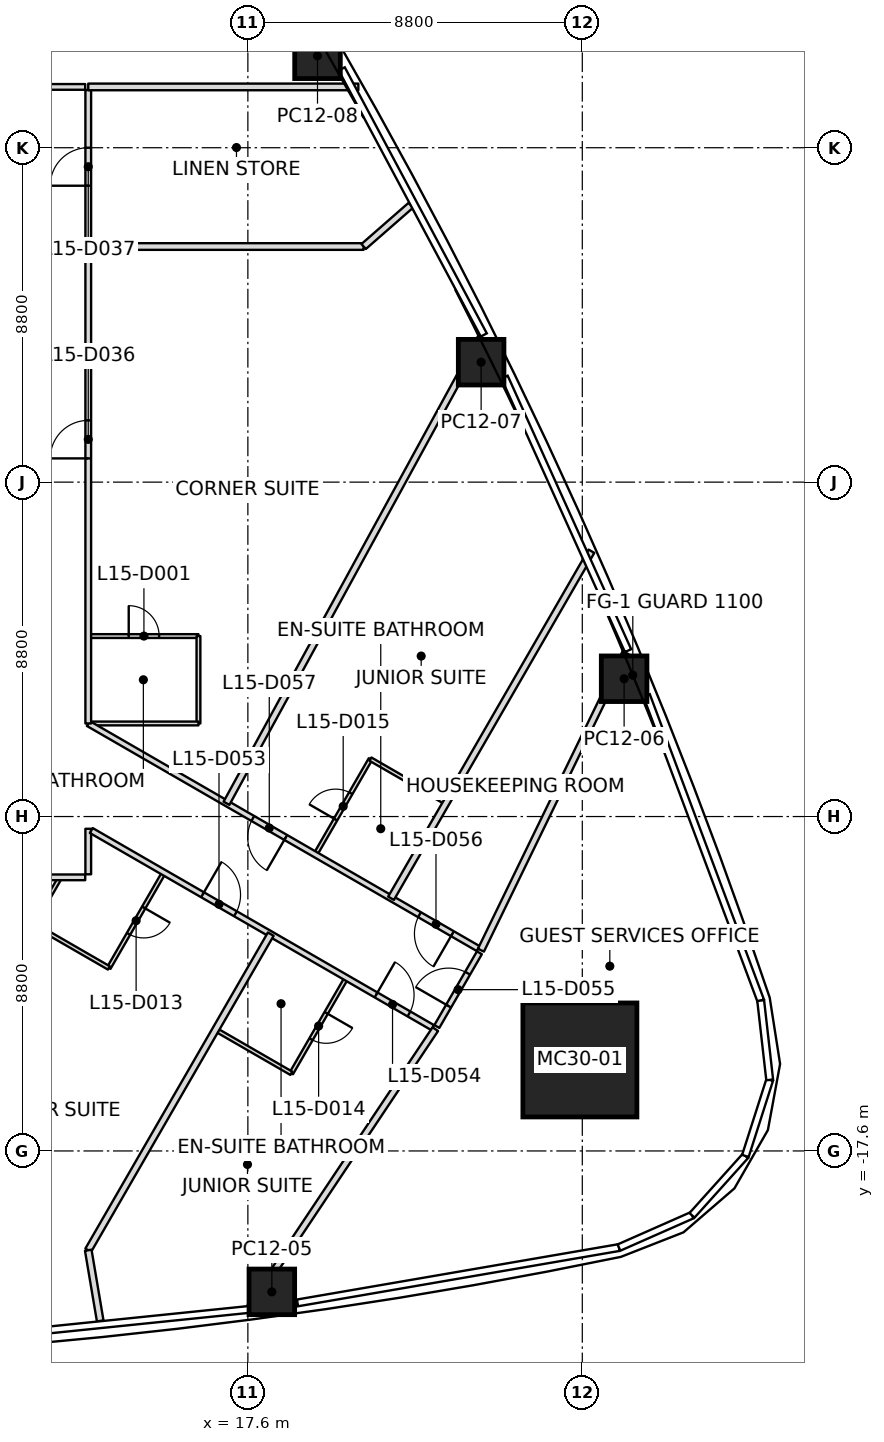
"""IFC4 building model, lengths in metres.
Left out: names, types, materials, properties, quantities, classifications, styles, units other than length and angle.
Written with IfcOpenShell. Run it as: python <this file> out.ifc"""

import sys

from ifc_helpers import new_model, si_unit, direction, frame, frame_2d, origin, origin_2d, place, context, subcontext, project, spatial, rectangle, extrude, clip, halfspace, element, fill, save


model = new_model("IFC4")
c1 = context("Model", 3, precision=1e-05, world=origin(), true_north=direction((0.0, 1.0)))
c2 = subcontext(c1, "Body", "Model", "MODEL_VIEW")
j1 = project(units=[si_unit("LENGTHUNIT", "METRE"), si_unit("PLANEANGLEUNIT", "RADIAN")], contexts=[c1])
p1 = place(None, origin())
s1 = spatial("IfcSite", under=j1, at=p1, CompositionType="ELEMENT")
p2 = place(p1, origin())
s2 = spatial("IfcBuilding", under=s1, at=p2, CompositionType="ELEMENT")
p3 = place(p2, frame((0.0, 0.0, 77.6)))
s3 = spatial("IfcBuildingStorey", under=s2, at=p3, CompositionType="ELEMENT", Elevation=77.6)
p4 = place(p3, frame((26.337, -15.206, 0.0), z_axis=(-0.030531956516, 0.017672925154, 0.999377539946), x_axis=(0.99953379114, 0.000539840661, 0.030527183636)))
e1 = element("IfcColumn", 1, at=p4, inside=s3, PredefinedType="COLUMN", context=c2, shape_type="SweptSolid", body=[
    extrude(rectangle(XDim=3.0, YDim=3.0, at=origin_2d()), origin(), (0.0, 0.0, 1.0), 3.702),
])
p5 = place(p3, frame((18.231, -21.308, 0.0), z_axis=(-0.019253687779, 0.03270489431, 0.999279583197), x_axis=(0.990559922783, 0.136298030063, 0.014624854803)))
e2 = element("IfcColumn", 2, at=p5, inside=s3, PredefinedType="COLUMN", context=c2, shape_type="SweptSolid", body=[
    clip(clip(extrude(rectangle(XDim=1.2, YDim=1.2, at=origin_2d()), origin(), (0.0, 0.0, 1.0), 3.703), halfspace(frame((0.0, 0.0, 0.015)), True)), halfspace(frame((0.0, 0.0, 3.695)), False)),
])
p6 = place(p3, frame((27.5, -5.174, 0.0), z_axis=(-0.019460655113, 0.011016709844, 0.999749926235), x_axis=(-0.381127273401, 0.924354950562, -0.017604739188)))
e3 = element("IfcColumn", 3, at=p6, inside=s3, PredefinedType="COLUMN", context=c2, shape_type="SweptSolid", body=[
    extrude(rectangle(XDim=1.2, YDim=1.2, at=origin_2d()), origin(), (0.0, 0.0, 1.0), 3.701),
])
p7 = place(p3, frame((23.738, 3.156, 0.0), z_axis=(-0.015240683228, 0.002309194428, 0.99988118754), x_axis=(-0.441517205772, 0.897209609592, -0.00880190108)))
e4 = element("IfcColumn", 4, at=p7, inside=s3, PredefinedType="COLUMN", context=c2, shape_type="SweptSolid", body=[
    extrude(rectangle(XDim=1.2, YDim=1.2, at=origin_2d()), origin(), (0.0, 0.0, 1.0), 3.7),
])
p8 = place(p3, frame((19.432, 11.219, 0.0), z_axis=(-0.010688725148, -0.006202099777, 0.999923639641), x_axis=(-0.499971436973, 0.8660418936, 2.7223042e-05)))
e5 = element("IfcColumn", 5, at=p8, inside=s3, PredefinedType="COLUMN", context=c2, shape_type="SweptSolid", body=[
    extrude(rectangle(XDim=1.2, YDim=1.2, at=origin_2d()), origin(), (0.0, 0.0, 1.0), 3.7),
])
p9 = place(p3, frame((18.202, -11.895, 0.0), z_axis=(0.0, 0.0, 1.0), x_axis=(-0.500004836318, -0.866022611517, 0.0)))
e6 = element("IfcWall", 6, at=p9, inside=s3, PredefinedType="PARTITIONING", context=c2, shape_type="SweptSolid", body=[
    extrude(rectangle(XDim=9.604, YDim=0.175, at=frame_2d((4.802, 0.0))), origin(), (0.0, 0.0, 1.0), 3.093),
])
p10 = place(p3, frame((13.4, -20.212, 0.0), z_axis=(0.0, 0.0, 1.0), x_axis=(0.166811851032, -0.985988745552, 0.0)))
e7 = element("IfcWall", 7, at=p10, inside=s3, PredefinedType="PARTITIONING", context=c2, shape_type="SweptSolid", body=[
    extrude(rectangle(XDim=1.886, YDim=0.175, at=frame_2d((0.943, 0.0))), origin(), (0.0, 0.0, 1.0), 2.934),
])
p11 = place(p3, frame((13.4, 6.2, 0.0), z_axis=(0.0, 0.0, 1.0), x_axis=(1.0, 0.0, 0.0)))
e8 = element("IfcWall", 8, at=p11, inside=s3, PredefinedType="PARTITIONING", context=c2, shape_type="SweptSolid", body=[
    extrude(rectangle(XDim=7.246, YDim=0.175, at=frame_2d((3.623, 0.0))), origin(), (0.0, 0.0, 1.0), 3.017),
])
p12 = place(p3, frame((20.646, 6.2, 0.0), z_axis=(0.0, 0.0, 1.0), x_axis=(0.752769014964, 0.658284748501, 0.0)))
e9 = element("IfcWall", 9, at=p12, inside=s3, PredefinedType="PARTITIONING", context=c2, shape_type="SweptSolid", body=[
    extrude(rectangle(XDim=1.651, YDim=0.175, at=frame_2d((0.826, 0.0))), origin(), (0.0, 0.0, 1.0), 2.934),
])
p13 = place(p3, frame((13.4, 10.4, 0.0), z_axis=(0.0, 0.0, 1.0), x_axis=(1.0, 0.0, 0.0)))
e10 = element("IfcWall", 10, at=p13, inside=s3, PredefinedType="PARTITIONING", context=c2, shape_type="SweptSolid", body=[
    extrude(rectangle(XDim=7.107, YDim=0.175, at=frame_2d((3.554, 0.0))), origin(), (0.0, 0.0, 1.0), 2.934),
])
p14 = place(p3, frame((23.741, 3.817, 0.0), z_axis=(0.0, 0.0, 1.0), x_axis=(-0.479523714328, -0.877528921117, 0.0)))
e11 = element("IfcWall", 11, at=p14, inside=s3, PredefinedType="PARTITIONING", context=c2, shape_type="SweptSolid", body=[
    extrude(rectangle(XDim=13.98, YDim=0.175, at=frame_2d((6.99, 0.0))), origin(), (0.0, 0.0, 1.0), 2.947),
])
p15 = place(p3, frame((22.532, -14.395, 0.0), z_axis=(0.0, 0.0, 1.0), x_axis=(-0.554931610564, -0.83189597162, 0.0)))
e12 = element("IfcWall", 12, at=p15, inside=s3, PredefinedType="PARTITIONING", context=c2, shape_type="SweptSolid", body=[
    extrude(rectangle(XDim=8.764, YDim=0.175, at=frame_2d((4.382, 0.0))), origin(), (0.0, 0.0, 1.0), 3.15),
])
p16 = place(p3, frame((26.64, -1.818, 0.0), z_axis=(0.0, 0.0, 1.0), x_axis=(-0.499990990727, -0.866030605228, 0.0)))
e13 = element("IfcWall", 13, at=p16, inside=s3, PredefinedType="PARTITIONING", context=c2, shape_type="SweptSolid", body=[
    extrude(rectangle(XDim=10.546, YDim=0.175, at=frame_2d((5.273, 0.0))), origin(), (0.0, 0.0, 1.0), 2.934),
])
p17 = place(p3, frame((23.732, -12.316, 0.0), z_axis=(0.0, 0.0, 1.0), x_axis=(0.437369474661, 0.899281903874, 0.0)))
e14 = element("IfcWall", 14, at=p17, inside=s3, PredefinedType="PARTITIONING", context=c2, shape_type="SweptSolid", body=[
    extrude(rectangle(XDim=8.704, YDim=0.175, at=frame_2d((4.352, 0.0))), origin(), (0.0, 0.0, 1.0), 3.15),
])
p18 = place(p3, frame((-13.32, -10.4, 0.0), z_axis=(0.0, 0.0, 1.0), x_axis=(1.0, 0.0, 0.0)))
e15 = element("IfcWall", 15, at=p18, inside=s3, PredefinedType="PARTITIONING", context=c2, shape_type="SweptSolid", body=[
    extrude(rectangle(XDim=26.64, YDim=0.15, at=frame_2d((13.32, 0.0))), origin(), (0.0, 0.0, 1.0), 2.947),
])
p19 = place(p18, frame((7.72, 0.0, 0.0)))
e16 = element("IfcOpeningElement", 16, at=p19, cuts=e15, PredefinedType="OPENING", context=c2, shape_type="SweptSolid", body=[
    extrude(rectangle(XDim=1.0, YDim=2.1, at=frame_2d((0.5, 1.05))), frame((0.0, 0.075, 0.0), z_axis=(0.0, -1.0, 0.0), x_axis=(1.0, 0.0, 0.0)), (0.0, 0.0, 1.0), 0.15),
])
p20 = place(p18, frame((11.92, 0.0, 0.0)))
e17 = element("IfcOpeningElement", 17, at=p20, cuts=e15, PredefinedType="OPENING", context=c2, shape_type="SweptSolid", body=[
    extrude(rectangle(XDim=1.0, YDim=2.1, at=frame_2d((0.5, 1.05))), frame((0.0, 0.075, 0.0), z_axis=(0.0, -1.0, 0.0), x_axis=(1.0, 0.0, 0.0)), (0.0, 0.0, 1.0), 0.15),
])
p21 = place(p18, frame((16.52, 0.0, 0.0)))
e18 = element("IfcOpeningElement", 18, at=p21, cuts=e15, PredefinedType="OPENING", context=c2, shape_type="SweptSolid", body=[
    extrude(rectangle(XDim=1.0, YDim=2.1, at=frame_2d((0.5, 1.05))), frame((0.0, 0.075, 0.0), z_axis=(0.0, -1.0, 0.0), x_axis=(1.0, 0.0, 0.0)), (0.0, 0.0, 1.0), 0.15),
])
p22 = place(p18, frame((21.12, 0.0, 0.0)))
e19 = element("IfcOpeningElement", 19, at=p22, cuts=e15, PredefinedType="OPENING", context=c2, shape_type="SweptSolid", body=[
    extrude(rectangle(XDim=1.0, YDim=2.1, at=frame_2d((0.5, 1.05))), frame((0.0, 0.075, 0.0), z_axis=(0.0, -1.0, 0.0), x_axis=(1.0, 0.0, 0.0)), (0.0, 0.0, 1.0), 0.15),
])
p23 = place(p3, frame((13.32, 10.4, 0.0), z_axis=(0.0, 0.0, 1.0), x_axis=(-1.0, 0.0, 0.0)))
e20 = element("IfcWall", 20, at=p23, inside=s3, PredefinedType="PARTITIONING", context=c2, shape_type="SweptSolid", body=[
    extrude(rectangle(XDim=7.04, YDim=0.15, at=frame_2d((3.52, 0.0))), origin(), (0.0, 0.0, 1.0), 2.947),
])
p24 = place(p23, frame((0.91, 0.0, 0.0)))
e21 = element("IfcOpeningElement", 21, at=p24, cuts=e20, PredefinedType="OPENING", context=c2, shape_type="SweptSolid", body=[
    extrude(rectangle(XDim=1.0, YDim=2.1, at=frame_2d((0.5, 1.05))), frame((0.0, 0.075, 0.0), z_axis=(0.0, -1.0, 0.0), x_axis=(1.0, 0.0, 0.0)), (0.0, 0.0, 1.0), 0.15),
])
p25 = place(p3, frame((13.4, -10.32, 0.0), z_axis=(0.0, 0.0, 1.0), x_axis=(0.0, 1.0, 0.0)))
e22 = element("IfcWall", 22, at=p25, inside=s3, PredefinedType="PARTITIONING", context=c2, shape_type="SweptSolid", body=[
    extrude(rectangle(XDim=1.198, YDim=0.15, at=frame_2d((0.599, 0.0))), origin(), (0.0, 0.0, 1.0), 2.797),
])
p26 = place(p3, frame((13.479, -9.168, 0.0), z_axis=(0.0, 0.0, 1.0), x_axis=(0.866028819782, -0.499994083273, 0.0)))
e23 = element("IfcWall", 23, at=p26, inside=s3, PredefinedType="PARTITIONING", context=c2, shape_type="SweptSolid", body=[
    extrude(rectangle(XDim=10.374, YDim=0.15, at=frame_2d((5.187, 0.0))), origin(), (0.0, 0.0, 1.0), 2.797),
])
p27 = place(p26, frame((3.381, 0.0, 0.0)))
e24 = element("IfcOpeningElement", 24, at=p27, cuts=e23, PredefinedType="OPENING", context=c2, shape_type="SweptSolid", body=[
    extrude(rectangle(XDim=1.0, YDim=2.1, at=frame_2d((0.5, 1.05))), frame((0.0, 0.075, 0.0), z_axis=(0.0, -1.0, 0.0), x_axis=(1.0, 0.0, 0.0)), (0.0, 0.0, 1.0), 0.15),
])
p28 = place(p26, frame((8.654, 0.0, 0.0)))
e25 = element("IfcOpeningElement", 25, at=p28, cuts=e23, PredefinedType="OPENING", context=c2, shape_type="SweptSolid", body=[
    extrude(rectangle(XDim=1.0, YDim=2.1, at=frame_2d((0.5, 1.05))), frame((0.0, 0.075, 0.0), z_axis=(0.0, -1.0, 0.0), x_axis=(1.0, 0.0, 0.0)), (0.0, 0.0, 1.0), 0.15),
])
p29 = place(p3, frame((23.663, -12.276, 0.0), z_axis=(0.0, 0.0, 1.0), x_axis=(-0.866031207587, 0.499989947384, 0.0)))
e26 = element("IfcWall", 26, at=p29, inside=s3, PredefinedType="PARTITIONING", context=c2, shape_type="SweptSolid", body=[
    extrude(rectangle(XDim=11.851, YDim=0.15, at=frame_2d((5.925, 0.0))), origin(), (0.0, 0.0, 1.0), 2.947),
])
p30 = place(p29, frame((0.785, 0.0, 0.0)))
e27 = element("IfcOpeningElement", 27, at=p30, cuts=e26, PredefinedType="OPENING", context=c2, shape_type="SweptSolid", body=[
    extrude(rectangle(XDim=1.0, YDim=2.1, at=frame_2d((0.5, 1.05))), frame((0.0, 0.075, 0.0), z_axis=(0.0, -1.0, 0.0), x_axis=(1.0, 0.0, 0.0)), (0.0, 0.0, 1.0), 0.15),
])
p31 = place(p29, frame((5.851, 0.0, 0.0)))
e28 = element("IfcOpeningElement", 28, at=p31, cuts=e26, PredefinedType="OPENING", context=c2, shape_type="SweptSolid", body=[
    extrude(rectangle(XDim=1.0, YDim=2.1, at=frame_2d((0.5, 1.05))), frame((0.0, 0.075, 0.0), z_axis=(0.0, -1.0, 0.0), x_axis=(1.0, 0.0, 0.0)), (0.0, 0.0, 1.0), 0.15),
])
p32 = place(p3, frame((13.4, -6.351, 0.0), z_axis=(0.0, 0.0, 1.0), x_axis=(0.0, 1.0, 0.0)))
e29 = element("IfcWall", 29, at=p32, inside=s3, PredefinedType="PARTITIONING", context=c2, shape_type="SweptSolid", body=[
    extrude(rectangle(XDim=16.671, YDim=0.15, at=frame_2d((8.335, 0.0))), origin(), (0.0, 0.0, 1.0), 2.947),
])
p33 = place(p32, frame((6.976, 0.0, 0.0)))
e30 = element("IfcOpeningElement", 30, at=p33, cuts=e29, PredefinedType="OPENING", context=c2, shape_type="SweptSolid", body=[
    extrude(rectangle(XDim=1.0, YDim=2.1, at=frame_2d((0.5, 1.05))), frame((0.0, 0.075, 0.0), z_axis=(0.0, -1.0, 0.0), x_axis=(1.0, 0.0, 0.0)), (0.0, 0.0, 1.0), 0.15),
])
p34 = place(p32, frame((14.151, 0.0, 0.0)))
e31 = element("IfcOpeningElement", 31, at=p34, cuts=e29, PredefinedType="OPENING", context=c2, shape_type="SweptSolid", body=[
    extrude(rectangle(XDim=1.0, YDim=2.1, at=frame_2d((0.5, 1.05))), frame((0.0, 0.075, 0.0), z_axis=(0.0, -1.0, 0.0), x_axis=(1.0, 0.0, 0.0)), (0.0, 0.0, 1.0), 0.15),
])
p35 = place(p3, frame((22.573, -14.325, 0.0), z_axis=(0.0, 0.0, 1.0), x_axis=(0.49994888933, 0.866054910533, 0.0)))
e32 = element("IfcWall", 32, at=p35, inside=s3, PredefinedType="PARTITIONING", context=c2, shape_type="SweptSolid", body=[
    extrude(rectangle(XDim=2.24, YDim=0.15, at=frame_2d((1.12, 0.0))), origin(), (0.0, 0.0, 1.0), 2.797),
])
p36 = place(p35, frame((0.62, 0.0, 0.0)))
e33 = element("IfcOpeningElement", 33, at=p36, cuts=e32, PredefinedType="OPENING", context=c2, shape_type="SweptSolid", body=[
    extrude(rectangle(XDim=1.0, YDim=2.1, at=frame_2d((0.5, 1.05))), frame((0.0, 0.075, 0.0), z_axis=(0.0, -1.0, 0.0), x_axis=(1.0, 0.0, 0.0)), (0.0, 0.0, 1.0), 0.15),
])
p37 = place(p3, frame((15.377, -10.298, 0.0), z_axis=(0.0, 0.0, 1.0), x_axis=(-0.499999802827, -0.866025517622, 0.0)))
e34 = element("IfcWall", 34, at=p37, inside=s3, PredefinedType="PARTITIONING", context=c2, shape_type="SweptSolid", body=[
    extrude(rectangle(XDim=2.87, YDim=0.1, at=frame_2d((1.435, 0.0))), origin(), (0.0, 0.0, 1.0), 2.797),
])
p38 = place(p37, frame((1.035, 0.0, 0.0)))
e35 = element("IfcOpeningElement", 35, at=p38, cuts=e34, PredefinedType="OPENING", context=c2, shape_type="SweptSolid", body=[
    extrude(rectangle(XDim=0.8, YDim=2.1, at=frame_2d((0.4, 1.05))), frame((0.0, 0.05, 0.0), z_axis=(0.0, -1.0, 0.0), x_axis=(1.0, 0.0, 0.0)), (0.0, 0.0, 1.0), 0.1),
])
p39 = place(p3, frame((13.942, -12.784, 0.0), z_axis=(0.0, 0.0, 1.0), x_axis=(-0.866007057882, 0.500031774688, 0.0)))
e36 = element("IfcWall", 36, at=p39, inside=s3, PredefinedType="PARTITIONING", context=c2, shape_type="SweptSolid", body=[
    extrude(rectangle(XDim=2.3, YDim=0.1, at=frame_2d((1.15, 0.0))), origin(), (0.0, 0.0, 1.0), 3.15),
])
p40 = place(p3, frame((11.95, -11.634, 0.0), z_axis=(0.0, 0.0, 1.0), x_axis=(0.500087364259, 0.86597495813, 0.0)))
e37 = element("IfcWall", 37, at=p40, inside=s3, PredefinedType="PARTITIONING", context=c2, shape_type="SweptSolid", body=[
    extrude(rectangle(XDim=1.39, YDim=0.1, at=frame_2d((0.695, 0.0))), origin(), (0.0, 0.0, 1.0), 3.15),
])
p41 = place(p3, frame((13.43, -4.051, 0.0), z_axis=(0.0, 0.0, 1.0), x_axis=(1.0, 0.0, 0.0)))
e38 = element("IfcWall", 38, at=p41, inside=s3, PredefinedType="PARTITIONING", context=c2, shape_type="SweptSolid", body=[
    extrude(rectangle(XDim=2.87, YDim=0.1, at=frame_2d((1.435, 0.0))), origin(), (0.0, 0.0, 1.0), 2.947),
])
p42 = place(p41, frame((1.035, 0.0, 0.0)))
e39 = element("IfcOpeningElement", 39, at=p42, cuts=e38, PredefinedType="OPENING", context=c2, shape_type="SweptSolid", body=[
    extrude(rectangle(XDim=0.8, YDim=2.1, at=frame_2d((0.4, 1.05))), frame((0.0, 0.05, 0.0), z_axis=(0.0, -1.0, 0.0), x_axis=(1.0, 0.0, 0.0)), (0.0, 0.0, 1.0), 0.1),
])
p43 = place(p3, frame((16.3, -4.051, 0.0), z_axis=(0.0, 0.0, 1.0), x_axis=(0.0, -1.0, 0.0)))
e40 = element("IfcWall", 40, at=p43, inside=s3, PredefinedType="PARTITIONING", context=c2, shape_type="SweptSolid", body=[
    extrude(rectangle(XDim=2.3, YDim=0.1, at=frame_2d((1.15, 0.0))), origin(), (0.0, 0.0, 1.0), 3.15),
])
p44 = place(p3, frame((16.3, -6.351, 0.0), z_axis=(0.0, 0.0, 1.0), x_axis=(-1.0, 0.0, 0.0)))
e41 = element("IfcWall", 41, at=p44, inside=s3, PredefinedType="PARTITIONING", context=c2, shape_type="SweptSolid", body=[
    extrude(rectangle(XDim=2.84, YDim=0.1, at=frame_2d((1.42, 0.0))), origin(), (0.0, 0.0, 1.0), 3.15),
])
p45 = place(p3, frame((20.179, -13.071, 0.0), z_axis=(0.0, 0.0, 1.0), x_axis=(-0.500036638401, -0.866004249561, 0.0)))
e42 = element("IfcWall", 42, at=p45, inside=s3, PredefinedType="PARTITIONING", context=c2, shape_type="SweptSolid", body=[
    extrude(rectangle(XDim=2.87, YDim=0.1, at=frame_2d((1.435, 0.0))), origin(), (0.0, 0.0, 1.0), 3.15),
])
p46 = place(p45, frame((1.035, 0.0, 0.0)))
e43 = element("IfcOpeningElement", 43, at=p46, cuts=e42, PredefinedType="OPENING", context=c2, shape_type="SweptSolid", body=[
    extrude(rectangle(XDim=0.8, YDim=2.1, at=frame_2d((0.4, 1.05))), frame((0.0, 0.05, 0.0), z_axis=(0.0, -1.0, 0.0), x_axis=(1.0, 0.0, 0.0)), (0.0, 0.0, 1.0), 0.1),
])
p47 = place(p3, frame((18.744, -15.556, 0.0), z_axis=(0.0, 0.0, 1.0), x_axis=(-0.866017224141, 0.500014167291, 0.0)))
e44 = element("IfcWall", 44, at=p47, inside=s3, PredefinedType="PARTITIONING", context=c2, shape_type="SweptSolid", body=[
    extrude(rectangle(XDim=2.27, YDim=0.1, at=frame_2d((1.135, 0.0))), origin(), (0.0, 0.0, 1.0), 3.15),
])
p48 = place(p3, frame((19.391, -9.775, 0.0), z_axis=(0.0, 0.0, 1.0), x_axis=(0.499999802827, 0.866025517622, 0.0)))
e45 = element("IfcWall", 45, at=p48, inside=s3, PredefinedType="PARTITIONING", context=c2, shape_type="SweptSolid", body=[
    extrude(rectangle(XDim=2.87, YDim=0.1, at=frame_2d((1.435, 0.0))), origin(), (0.0, 0.0, 1.0), 3.15),
])
p49 = place(p48, frame((1.035, 0.0, 0.0)))
e46 = element("IfcOpeningElement", 46, at=p49, cuts=e45, PredefinedType="OPENING", context=c2, shape_type="SweptSolid", body=[
    extrude(rectangle(XDim=0.8, YDim=2.1, at=frame_2d((0.4, 1.05))), frame((0.0, 0.05, 0.0), z_axis=(0.0, -1.0, 0.0), x_axis=(1.0, 0.0, 0.0)), (0.0, 0.0, 1.0), 0.1),
])
p50 = place(p3, frame((20.826, -7.289, 0.0), z_axis=(0.0, 0.0, 1.0), x_axis=(0.866017224141, -0.500014167291, 0.0)))
e47 = element("IfcWall", 47, at=p50, inside=s3, PredefinedType="PARTITIONING", context=c2, shape_type="SweptSolid", body=[
    extrude(rectangle(XDim=2.27, YDim=0.1, at=frame_2d((1.135, 0.0))), origin(), (0.0, 0.0, 1.0), 3.15),
])
p51 = place(p33, origin())
e48 = element("IfcDoor", 48, at=p51, inside=s3, OperationType="SINGLE_SWING_LEFT", PredefinedType="DOOR", context=c2, shape_type="SweptSolid", body=[
    extrude(rectangle(XDim=1.0, YDim=2.1, at=frame_2d((0.5, 1.05))), frame((0.0, 0.025, 0.0), z_axis=(0.0, -1.0, 0.0), x_axis=(1.0, 0.0, 0.0)), (0.0, 0.0, 1.0), 0.05),
])
fill(e30, e48)
p52 = place(p42, origin())
e49 = element("IfcDoor", 49, at=p52, inside=s3, OperationType="SINGLE_SWING_LEFT", PredefinedType="DOOR", context=c2, shape_type="SweptSolid", body=[
    extrude(rectangle(XDim=0.8, YDim=2.1, at=frame_2d((0.4, 1.05))), frame((0.0, 0.025, 0.0), z_axis=(0.0, -1.0, 0.0), x_axis=(1.0, 0.0, 0.0)), (0.0, 0.0, 1.0), 0.05),
])
fill(e39, e49)
p53 = place(p34, origin())
e50 = element("IfcDoor", 50, at=p53, inside=s3, OperationType="SINGLE_SWING_RIGHT", PredefinedType="DOOR", context=c2, shape_type="SweptSolid", body=[
    extrude(rectangle(XDim=1.0, YDim=2.1, at=frame_2d((0.5, 1.05))), frame((0.0, 0.025, 0.0), z_axis=(0.0, -1.0, 0.0), x_axis=(1.0, 0.0, 0.0)), (0.0, 0.0, 1.0), 0.05),
])
fill(e31, e50)
p54 = place(p27, origin())
e51 = element("IfcDoor", 51, at=p54, inside=s3, OperationType="SINGLE_SWING_LEFT", PredefinedType="DOOR", context=c2, shape_type="SweptSolid", body=[
    extrude(rectangle(XDim=1.0, YDim=2.1, at=frame_2d((0.5, 1.05))), frame((0.0, 0.025, 0.0), z_axis=(0.0, -1.0, 0.0), x_axis=(1.0, 0.0, 0.0)), (0.0, 0.0, 1.0), 0.05),
])
fill(e24, e51)
p55 = place(p38, origin())
e52 = element("IfcDoor", 52, at=p55, inside=s3, OperationType="SINGLE_SWING_RIGHT", PredefinedType="DOOR", context=c2, shape_type="SweptSolid", body=[
    extrude(rectangle(XDim=0.8, YDim=2.1, at=frame_2d((0.4, 1.05))), frame((0.0, 0.025, 0.0), z_axis=(0.0, -1.0, 0.0), x_axis=(1.0, 0.0, 0.0)), (0.0, 0.0, 1.0), 0.05),
])
fill(e35, e52)
p56 = place(p28, origin())
e53 = element("IfcDoor", 53, at=p56, inside=s3, OperationType="SINGLE_SWING_LEFT", PredefinedType="DOOR", context=c2, shape_type="SweptSolid", body=[
    extrude(rectangle(XDim=1.0, YDim=2.1, at=frame_2d((0.5, 1.05))), frame((0.0, 0.025, 0.0), z_axis=(0.0, -1.0, 0.0), x_axis=(1.0, 0.0, 0.0)), (0.0, 0.0, 1.0), 0.05),
])
fill(e25, e53)
p57 = place(p46, origin())
e54 = element("IfcDoor", 54, at=p57, inside=s3, OperationType="SINGLE_SWING_RIGHT", PredefinedType="DOOR", context=c2, shape_type="SweptSolid", body=[
    extrude(rectangle(XDim=0.8, YDim=2.1, at=frame_2d((0.4, 1.05))), frame((0.0, 0.025, 0.0), z_axis=(0.0, -1.0, 0.0), x_axis=(1.0, 0.0, 0.0)), (0.0, 0.0, 1.0), 0.05),
])
fill(e43, e54)
p58 = place(p36, origin())
e55 = element("IfcDoor", 55, at=p58, inside=s3, OperationType="SINGLE_SWING_LEFT", PredefinedType="DOOR", context=c2, shape_type="SweptSolid", body=[
    extrude(rectangle(XDim=1.0, YDim=2.1, at=frame_2d((0.5, 1.05))), frame((0.0, 0.025, 0.0), z_axis=(0.0, -1.0, 0.0), x_axis=(1.0, 0.0, 0.0)), (0.0, 0.0, 1.0), 0.05),
])
fill(e33, e55)
p59 = place(p30, origin())
e56 = element("IfcDoor", 56, at=p59, inside=s3, OperationType="SINGLE_SWING_RIGHT", PredefinedType="DOOR", context=c2, shape_type="SweptSolid", body=[
    extrude(rectangle(XDim=1.0, YDim=2.1, at=frame_2d((0.5, 1.05))), frame((0.0, 0.025, 0.0), z_axis=(0.0, -1.0, 0.0), x_axis=(1.0, 0.0, 0.0)), (0.0, 0.0, 1.0), 0.05),
])
fill(e27, e56)
p60 = place(p31, origin())
e57 = element("IfcDoor", 57, at=p60, inside=s3, OperationType="SINGLE_SWING_LEFT", PredefinedType="DOOR", context=c2, shape_type="SweptSolid", body=[
    extrude(rectangle(XDim=1.0, YDim=2.1, at=frame_2d((0.5, 1.05))), frame((0.0, 0.025, 0.0), z_axis=(0.0, -1.0, 0.0), x_axis=(1.0, 0.0, 0.0)), (0.0, 0.0, 1.0), 0.05),
])
fill(e28, e57)
p61 = place(p49, origin())
e58 = element("IfcDoor", 58, at=p61, inside=s3, OperationType="SINGLE_SWING_LEFT", PredefinedType="DOOR", context=c2, shape_type="SweptSolid", body=[
    extrude(rectangle(XDim=0.8, YDim=2.1, at=frame_2d((0.4, 1.05))), frame((0.0, 0.025, 0.0), z_axis=(0.0, -1.0, 0.0), x_axis=(1.0, 0.0, 0.0)), (0.0, 0.0, 1.0), 0.05),
])
fill(e46, e58)
save(model, sys.argv[1])
